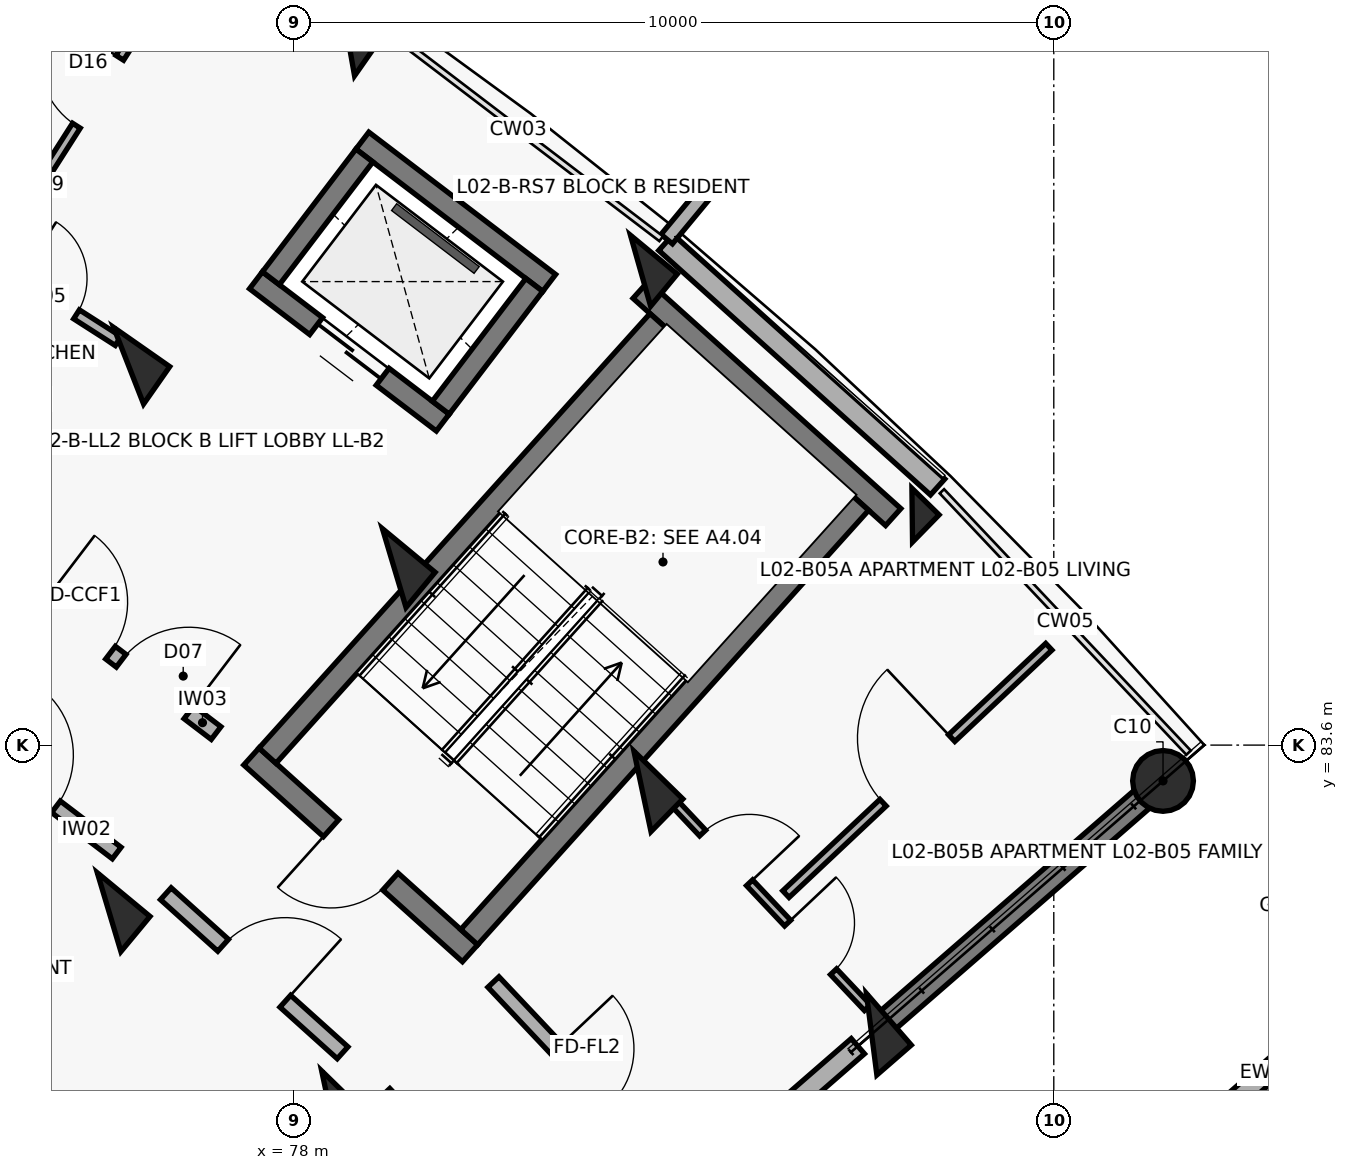
"""IFC4 building model, lengths in metres.
Left out: names, types, materials, properties, quantities, classifications, styles, units other than length and angle.
Written with IfcOpenShell. Run it as: python <this file> out.ifc"""

import sys

from ifc_helpers import new_model, si_unit, direction, frame, frame_2d, origin, origin_2d, place, context, subcontext, project, spatial, rectangle, circle, extrude, element, fill, save


model = new_model("IFC4")
c1 = context("Model", 3, precision=1e-05, world=origin(), true_north=direction((0.0, 1.0)))
c2 = subcontext(c1, "Body", "Model", "MODEL_VIEW")
j1 = project(units=[si_unit("LENGTHUNIT", "METRE"), si_unit("PLANEANGLEUNIT", "RADIAN")], contexts=[c1])
p1 = place(None, origin())
s1 = spatial("IfcSite", under=j1, at=p1, CompositionType="ELEMENT")
p2 = place(p1, origin())
s2 = spatial("IfcBuilding", under=s1, at=p2, CompositionType="ELEMENT")
p3 = place(p2, frame((0.0, 0.0, 8.1)))
s3 = spatial("IfcBuildingStorey", under=s2, at=p3, CompositionType="ELEMENT", Elevation=8.1)
p4 = place(p3, frame((75.828, 88.592, 0.0), z_axis=(0.0, 0.0, 1.0), x_axis=(0.573004420611, 0.819552276527, 0.0)))
e1 = element("IfcColumn", 1, at=p4, inside=s3, PredefinedType="COLUMN", context=c2, shape_type="SweptSolid", body=[
    extrude(rectangle(XDim=0.6, YDim=0.9, at=origin_2d()), origin(), (0.0, 0.0, 1.0), 3.1),
])
p5 = place(p3, frame((78.739, 92.755, 0.0), z_axis=(0.0, 0.0, 1.0), x_axis=(0.573004420611, 0.819552276527, 0.0)))
e2 = element("IfcColumn", 2, at=p5, inside=s3, PredefinedType="COLUMN", context=c2, shape_type="SweptSolid", body=[
    extrude(rectangle(XDim=0.5, YDim=0.5, at=origin_2d()), origin(), (0.0, 0.0, 1.0), 3.1),
])
for number, where, z_axis, x_axis in (
    (3, (75.571, 81.402, 0.0), (0.0, 0.0, 1.0), (0.638, 0.77, 0.0)),
    (4, (79.322, 85.93, 0.0), (0.0, 0.0, 1.0), (0.638, 0.77, 0.0)),
):
    element("IfcColumn", number, at=place(p3, frame(where, z_axis=z_axis, x_axis=x_axis)), inside=s3, PredefinedType="COLUMN", context=c2, shape_type="SweptSolid", body=[
        extrude(rectangle(XDim=0.6, YDim=0.9, at=origin_2d()), origin(), (0.0, 0.0, 1.0), 3.1),
    ])
p6 = place(p3, frame((82.563, 89.842, 0.0), z_axis=(0.0, 0.0, 1.0), x_axis=(0.637961754089, 0.770068049148, 0.0)))
e5 = element("IfcColumn", 5, at=p6, inside=s3, PredefinedType="COLUMN", context=c2, shape_type="SweptSolid", body=[
    extrude(rectangle(XDim=0.55, YDim=0.8, at=origin_2d()), origin(), (0.0, 0.0, 1.0), 3.1),
])
for number, where, z_axis, x_axis in (
    (6, (78.48, 78.784, 0.0), (0.0, 0.0, 1.0), (0.699, 0.715, 0.0)),
    (7, (82.588, 82.991, 0.0), (0.0, 0.0, 1.0), (0.699, 0.715, 0.0)),
):
    element("IfcColumn", number, at=place(p3, frame(where, z_axis=z_axis, x_axis=x_axis)), inside=s3, PredefinedType="COLUMN", context=c2, shape_type="SweptSolid", body=[
        extrude(rectangle(XDim=0.6, YDim=0.9, at=origin_2d()), origin(), (0.0, 0.0, 1.0), 3.1),
    ])
p7 = place(p3, frame((86.137, 86.626, 0.0), z_axis=(0.0, 0.0, 1.0), x_axis=(0.698665066769, 0.715448897181, 0.0)))
e8 = element("IfcColumn", 8, at=p7, inside=s3, PredefinedType="COLUMN", context=c2, shape_type="SweptSolid", body=[
    extrude(rectangle(XDim=0.5, YDim=0.5, at=origin_2d()), origin(), (0.0, 0.0, 1.0), 3.1),
])
p8 = place(p3, frame((85.603, 79.796, 0.0), z_axis=(0.0, 0.0, 1.0), x_axis=(0.754709580223, 0.656059028991, 0.0)))
e9 = element("IfcColumn", 9, at=p8, inside=s3, PredefinedType="COLUMN", context=c2, shape_type="SweptSolid", body=[
    extrude(rectangle(XDim=0.6, YDim=0.9, at=origin_2d()), origin(), (0.0, 0.0, 1.0), 3.1),
])
p9 = place(p3, frame((89.437, 83.129, 0.0), z_axis=(0.0, 0.0, 1.0), x_axis=(0.754709580223, 0.656059028991, 0.0)))
e10 = element("IfcColumn", 10, at=p9, inside=s3, PredefinedType="COLUMN", context=c2, shape_type="SweptSolid", body=[
    extrude(circle(Radius=0.4, at=origin_2d()), origin(), (0.0, 0.0, 1.0), 3.1),
])
p10 = place(p3, frame((85.739, 79.914, 0.0), z_axis=(0.0, 0.0, 1.0), x_axis=(0.754703505217, 0.65606601742, 0.0)))
e11 = element("IfcWall", 11, at=p10, inside=s3, PredefinedType="SHEAR", context=c2, shape_type="SweptSolid", body=[
    extrude(rectangle(XDim=4.72, YDim=0.31, at=frame_2d((2.36, 0.0))), origin(), (0.0, 0.0, 1.0), 2.86),
])
p11 = place(p3, frame((82.897, 90.213, 0.0), z_axis=(0.0, 0.0, 1.0), x_axis=(0.743387539862, -0.668860946369, 0.0)))
e12 = element("IfcWall", 12, at=p11, inside=s3, PredefinedType="SOLIDWALL", context=c2, shape_type="SweptSolid", body=[
    extrude(rectangle(XDim=4.809, YDim=0.282, at=frame_2d((2.405, 0.0))), origin(), (0.0, 0.0, 1.0), 2.25),
])
p12 = place(p3, frame((82.908, 90.257, 0.0), z_axis=(0.0, 0.0, 1.0), x_axis=(0.637967316825, 0.770063440674, 0.0)))
e13 = element("IfcWall", 13, at=p12, inside=s3, PredefinedType="PARAPET", context=c2, shape_type="SweptSolid", body=[
    extrude(rectangle(XDim=0.9, YDim=0.195, at=frame_2d((0.45, 0.0))), origin(), (0.0, 0.0, 1.0), 2.25),
])
p13 = place(p3, frame((79.234, 74.259, 0.0), z_axis=(0.0, 0.0, 1.0), x_axis=(0.754717680958, 0.656049710044, 0.0)))
e14 = element("IfcWall", 14, at=p13, inside=s3, PredefinedType="SOLIDWALL", context=c2, shape_type="SweptSolid", body=[
    extrude(rectangle(XDim=8.2, YDim=0.265, at=frame_2d((4.1, 0.0))), origin(), (0.0, 0.0, 1.0), 2.08),
])
p14 = place(p13, frame((3.59, 0.0, 0.75)))
e15 = element("IfcOpeningElement", 15, at=p14, cuts=e14, PredefinedType="OPENING", context=c2, shape_type="SweptSolid", body=[
    extrude(rectangle(XDim=1.35, YDim=1.35, at=frame_2d((0.675, 0.675))), frame((0.0, 0.142, 0.0), z_axis=(0.0, -1.0, 0.0), x_axis=(1.0, 0.0, 0.0)), (0.0, 0.0, 1.0), 0.285),
])
p15 = place(p3, frame((91.746, 80.101, 0.0), z_axis=(0.0, 0.0, 1.0), x_axis=(-0.754704866158, -0.656064451862, 0.0)))
e16 = element("IfcWall", 16, at=p15, inside=s3, PredefinedType="SOLIDWALL", context=c2, shape_type="SweptSolid", body=[
    extrude(rectangle(XDim=8.2, YDim=0.265, at=frame_2d((4.1, 0.0))), origin(), (0.0, 0.0, 1.0), 2.08),
])
p16 = place(p15, frame((3.59, 0.0, 0.75)))
e17 = element("IfcOpeningElement", 17, at=p16, cuts=e16, PredefinedType="OPENING", context=c2, shape_type="SweptSolid", body=[
    extrude(rectangle(XDim=1.35, YDim=1.35, at=frame_2d((0.675, 0.675))), frame((0.0, 0.142, 0.0), z_axis=(0.0, -1.0, 0.0), x_axis=(1.0, 0.0, 0.0)), (0.0, 0.0, 1.0), 0.285),
])
p17 = place(p3, frame((80.32, 80.862, 0.0), z_axis=(0.0, 0.0, 1.0), x_axis=(-0.743375696158, 0.668874109501, 0.0)))
e18 = element("IfcWall", 18, at=p17, inside=s3, PredefinedType="SHEAR", context=c2, shape_type="SweptSolid", body=[
    extrude(rectangle(XDim=3.87, YDim=0.3, at=frame_2d((1.935, 0.0))), origin(), (0.0, 0.0, 1.0), 3.1),
])
p18 = place(p17, frame((1.41, 0.0, 0.0)))
e19 = element("IfcOpeningElement", 19, at=p18, cuts=e18, PredefinedType="OPENING", context=c2, shape_type="SweptSolid", body=[
    extrude(rectangle(XDim=1.05, YDim=2.15, at=frame_2d((0.525, 1.075))), frame((0.0, 0.16, 0.0), z_axis=(0.0, -1.0, 0.0), x_axis=(1.0, 0.0, 0.0)), (0.0, 0.0, 1.0), 0.32),
])
p19 = place(p3, frame((85.887, 86.601, 0.0), z_axis=(0.0, 0.0, 1.0), x_axis=(-0.743400052815, 0.668847038922, 0.0)))
e20 = element("IfcWall", 20, at=p19, inside=s3, PredefinedType="SHEAR", context=c2, shape_type="SweptSolid", body=[
    extrude(rectangle(XDim=4.47, YDim=0.3, at=frame_2d((2.235, 0.0))), origin(), (0.0, 0.0, 1.0), 3.1),
])
p20 = place(p3, frame((80.309, 81.073, 0.0), z_axis=(0.0, 0.0, 1.0), x_axis=(0.668885797871, 0.743365179038, 0.0)))
e21 = element("IfcWall", 21, at=p20, inside=s3, PredefinedType="SHEAR", context=c2, shape_type="SweptSolid", body=[
    extrude(rectangle(XDim=7.69, YDim=0.3, at=frame_2d((3.845, 0.0))), origin(), (0.0, 0.0, 1.0), 3.1),
])
p21 = place(p3, frame((77.655, 83.461, 0.0), z_axis=(0.0, 0.0, 1.0), x_axis=(0.668868253964, 0.743380964808, 0.0)))
e22 = element("IfcWall", 22, at=p21, inside=s3, PredefinedType="SHEAR", context=c2, shape_type="SweptSolid", body=[
    extrude(rectangle(XDim=7.69, YDim=0.3, at=frame_2d((3.845, 0.0))), origin(), (0.0, 0.0, 1.0), 3.1),
])
p22 = place(p3, frame((79.961, 87.844, 0.0), z_axis=(0.0, 0.0, 1.0), x_axis=(-0.795464365424, 0.606000365793, 0.0)))
e23 = element("IfcWall", 23, at=p22, inside=s3, PredefinedType="SHEAR", context=c2, shape_type="SweptSolid", body=[
    extrude(rectangle(XDim=3.09, YDim=0.28, at=frame_2d((1.545, 0.0))), origin(), (0.0, 0.0, 1.0), 3.1),
])
p23 = place(p22, frame((0.995, 0.0, 0.0)))
e24 = element("IfcOpeningElement", 24, at=p23, cuts=e23, PredefinedType="OPENING", context=c2, shape_type="SweptSolid", body=[
    extrude(rectangle(XDim=1.1, YDim=2.15, at=frame_2d((0.55, 1.075))), frame((0.0, 0.15, 0.0), z_axis=(0.0, -1.0, 0.0), x_axis=(1.0, 0.0, 0.0)), (0.0, 0.0, 1.0), 0.3),
])
p24 = place(p3, frame((81.361, 89.681, 0.0), z_axis=(0.0, 0.0, 1.0), x_axis=(-0.795502452183, 0.605950368076, 0.0)))
e25 = element("IfcWall", 25, at=p24, inside=s3, PredefinedType="SHEAR", context=c2, shape_type="SweptSolid", body=[
    extrude(rectangle(XDim=3.09, YDim=0.28, at=frame_2d((1.545, 0.0))), origin(), (0.0, 0.0, 1.0), 3.1),
])
for number, where, z_axis, x_axis in (
    (26, (79.935, 88.04, 0.0), (0.0, 0.0, 1.0), (0.606, 0.795, 0.0)),
    (27, (77.699, 89.743, 0.0), (0.0, 0.0, 1.0), (0.606, 0.795, 0.0)),
):
    element("IfcWall", number, at=place(p3, frame(where, z_axis=z_axis, x_axis=x_axis)), inside=s3, PredefinedType="SHEAR", context=c2, shape_type="SweptSolid", body=[
        extrude(rectangle(XDim=2.03, YDim=0.28, at=frame_2d((1.015, 0.0))), origin(), (0.0, 0.0, 1.0), 3.1),
    ])
p25 = place(p3, frame((72.481, 90.971, 0.0), z_axis=(0.0, 0.0, 1.0), x_axis=(0.842238809758, -0.53910461632, 0.0)))
e28 = element("IfcWall", 28, at=p25, inside=s3, PredefinedType="PARTITIONING", context=c2, shape_type="SweptSolid", body=[
    extrude(rectangle(XDim=3.81, YDim=0.14, at=frame_2d((1.905, 0.0))), origin(), (0.0, 0.0, 1.0), 2.08),
])
p26 = place(p25, frame((0.65, 0.0, 0.0)))
e29 = element("IfcOpeningElement", 29, at=p26, cuts=e28, PredefinedType="OPENING", context=c2, shape_type="SweptSolid", body=[
    extrude(rectangle(XDim=0.9, YDim=2.1, at=frame_2d((0.45, 1.05))), frame((0.0, 0.08, 0.0), z_axis=(0.0, -1.0, 0.0), x_axis=(1.0, 0.0, 0.0)), (0.0, 0.0, 1.0), 0.16),
])
p27 = place(p25, frame((2.28, 0.0, 0.0)))
e30 = element("IfcOpeningElement", 30, at=p27, cuts=e28, PredefinedType="OPENING", context=c2, shape_type="SweptSolid", body=[
    extrude(rectangle(XDim=0.88, YDim=2.1, at=frame_2d((0.44, 1.05))), frame((0.0, 0.08, 0.0), z_axis=(0.0, -1.0, 0.0), x_axis=(1.0, 0.0, 0.0)), (0.0, 0.0, 1.0), 0.16),
])
p28 = place(p3, frame((74.148, 90.195, 0.0), z_axis=(0.0, 0.0, 1.0), x_axis=(0.537779792606, 0.843085342456, 0.0)))
e31 = element("IfcWall", 31, at=p28, inside=s3, PredefinedType="PARTITIONING", context=c2, shape_type="SweptSolid", body=[
    extrude(rectangle(XDim=4.75, YDim=0.12, at=frame_2d((2.375, 0.0))), origin(), (0.0, 0.0, 1.0), 2.08),
])
p29 = place(p28, frame((1.845, 0.0, 0.0)))
e32 = element("IfcOpeningElement", 32, at=p29, cuts=e31, PredefinedType="OPENING", context=c2, shape_type="SweptSolid", body=[
    extrude(rectangle(XDim=1.06, YDim=2.1, at=frame_2d((0.53, 1.05))), frame((0.0, 0.07, 0.0), z_axis=(0.0, -1.0, 0.0), x_axis=(1.0, 0.0, 0.0)), (0.0, 0.0, 1.0), 0.14),
])
p30 = place(p3, frame((74.357, 85.756, 0.0), z_axis=(0.0, 0.0, 1.0), x_axis=(0.795498026433, -0.605956178235, 0.0)))
e33 = element("IfcWall", 33, at=p30, inside=s3, PredefinedType="SOLIDWALL", context=c2, shape_type="SweptSolid", body=[
    extrude(rectangle(XDim=3.296, YDim=0.21, at=frame_2d((1.648, 0.0))), origin(), (0.0, 0.0, 1.0), 2.08),
])
p31 = place(p30, frame((0.45, 0.0, 0.0)))
e34 = element("IfcOpeningElement", 34, at=p31, cuts=e33, PredefinedType="OPENING", context=c2, shape_type="SweptSolid", body=[
    extrude(rectangle(XDim=1.1, YDim=2.15, at=frame_2d((0.55, 1.075))), frame((0.0, 0.115, 0.0), z_axis=(0.0, -1.0, 0.0), x_axis=(1.0, 0.0, 0.0)), (0.0, 0.0, 1.0), 0.23),
])
p32 = place(p30, frame((1.726, 0.0, 0.0)))
e35 = element("IfcOpeningElement", 35, at=p32, cuts=e33, PredefinedType="OPENING", context=c2, shape_type="SweptSolid", body=[
    extrude(rectangle(XDim=1.12, YDim=2.15, at=frame_2d((0.56, 1.075))), frame((0.0, 0.115, 0.0), z_axis=(0.0, -1.0, 0.0), x_axis=(1.0, 0.0, 0.0)), (0.0, 0.0, 1.0), 0.23),
])
p33 = place(p3, frame((73.182, 84.076, 0.0), z_axis=(0.0, 0.0, 1.0), x_axis=(0.795501577908, -0.605951515838, 0.0)))
e36 = element("IfcWall", 36, at=p33, inside=s3, PredefinedType="SOLIDWALL", context=c2, shape_type="SweptSolid", body=[
    extrude(rectangle(XDim=3.129, YDim=0.19, at=frame_2d((1.564, 0.0))), origin(), (0.0, 0.0, 1.0), 2.08),
])
p34 = place(p33, frame((1.004, 0.0, 0.0)))
e37 = element("IfcOpeningElement", 37, at=p34, cuts=e36, PredefinedType="OPENING", context=c2, shape_type="SweptSolid", body=[
    extrude(rectangle(XDim=1.12, YDim=2.15, at=frame_2d((0.56, 1.075))), frame((0.0, 0.105, 0.0), z_axis=(0.0, -1.0, 0.0), x_axis=(1.0, 0.0, 0.0)), (0.0, 0.0, 1.0), 0.21),
])
p35 = place(p3, frame((76.317, 81.644, 0.0), z_axis=(0.0, 0.0, 1.0), x_axis=(0.743387266925, -0.668861249718, 0.0)))
e38 = element("IfcWall", 38, at=p35, inside=s3, PredefinedType="SOLIDWALL", context=c2, shape_type="SweptSolid", body=[
    extrude(rectangle(XDim=3.128, YDim=0.21, at=frame_2d((1.564, 0.0))), origin(), (0.0, 0.0, 1.0), 2.08),
])
p36 = place(p35, frame((1.014, 0.0, 0.0)))
e39 = element("IfcOpeningElement", 39, at=p36, cuts=e38, PredefinedType="OPENING", context=c2, shape_type="SweptSolid", body=[
    extrude(rectangle(XDim=1.1, YDim=2.15, at=frame_2d((0.55, 1.075))), frame((0.0, 0.115, 0.0), z_axis=(0.0, -1.0, 0.0), x_axis=(1.0, 0.0, 0.0)), (0.0, 0.0, 1.0), 0.23),
])
p37 = place(p3, frame((80.628, 80.483, 0.0), z_axis=(0.0, 0.0, 1.0), x_axis=(0.686310507227, -0.727308660522, 0.0)))
e40 = element("IfcWall", 40, at=p37, inside=s3, PredefinedType="SOLIDWALL", context=c2, shape_type="SweptSolid", body=[
    extrude(rectangle(XDim=3.436, YDim=0.2, at=frame_2d((1.718, 0.0))), origin(), (0.0, 0.0, 1.0), 2.08),
])
p38 = place(p37, frame((1.208, 0.0, 0.0)))
e41 = element("IfcOpeningElement", 41, at=p38, cuts=e40, PredefinedType="OPENING", context=c2, shape_type="SweptSolid", body=[
    extrude(rectangle(XDim=1.02, YDim=2.15, at=frame_2d((0.51, 1.075))), frame((0.0, 0.11, 0.0), z_axis=(0.0, -1.0, 0.0), x_axis=(1.0, 0.0, 0.0)), (0.0, 0.0, 1.0), 0.22),
])
p39 = place(p3, frame((79.195, 79.016, 0.0), z_axis=(0.0, 0.0, 1.0), x_axis=(0.686307658735, -0.727311348434, 0.0)))
e42 = element("IfcWall", 42, at=p39, inside=s3, PredefinedType="SOLIDWALL", context=c2, shape_type="SweptSolid", body=[
    extrude(rectangle(XDim=3.269, YDim=0.19, at=frame_2d((1.634, 0.0))), origin(), (0.0, 0.0, 1.0), 2.08),
])
p40 = place(p39, frame((1.154, 0.0, 0.0)))
e43 = element("IfcOpeningElement", 43, at=p40, cuts=e42, PredefinedType="OPENING", context=c2, shape_type="SweptSolid", body=[
    extrude(rectangle(XDim=0.96, YDim=2.1, at=frame_2d((0.48, 1.05))), frame((0.0, 0.105, 0.0), z_axis=(0.0, -1.0, 0.0), x_axis=(1.0, 0.0, 0.0)), (0.0, 0.0, 1.0), 0.21),
])
p41 = place(p3, frame((82.934, 82.916, 0.0), z_axis=(0.0, 0.0, 1.0), x_axis=(0.686301674417, -0.727316995327, 0.0)))
e44 = element("IfcWall", 44, at=p41, inside=s3, PredefinedType="PARTITIONING", context=c2, shape_type="SweptSolid", body=[
    extrude(rectangle(XDim=3.81, YDim=0.11, at=frame_2d((1.905, 0.0))), origin(), (0.0, 0.0, 1.0), 2.08),
])
p42 = place(p41, frame((0.65, 0.0, 0.0)))
e45 = element("IfcOpeningElement", 45, at=p42, cuts=e44, PredefinedType="OPENING", context=c2, shape_type="SweptSolid", body=[
    extrude(rectangle(XDim=0.9, YDim=2.1, at=frame_2d((0.45, 1.05))), frame((0.0, 0.065, 0.0), z_axis=(0.0, -1.0, 0.0), x_axis=(1.0, 0.0, 0.0)), (0.0, 0.0, 1.0), 0.13),
])
p43 = place(p41, frame((2.28, 0.0, 0.0)))
e46 = element("IfcOpeningElement", 46, at=p43, cuts=e44, PredefinedType="OPENING", context=c2, shape_type="SweptSolid", body=[
    extrude(rectangle(XDim=0.88, YDim=2.1, at=frame_2d((0.44, 1.05))), frame((0.0, 0.065, 0.0), z_axis=(0.0, -1.0, 0.0), x_axis=(1.0, 0.0, 0.0)), (0.0, 0.0, 1.0), 0.13),
])
p44 = place(p3, frame((84.475, 81.639, 0.0), z_axis=(0.0, 0.0, 1.0), x_axis=(0.728314662127, 0.685242842306, 0.0)))
e47 = element("IfcWall", 47, at=p44, inside=s3, PredefinedType="PARTITIONING", context=c2, shape_type="SweptSolid", body=[
    extrude(rectangle(XDim=4.75, YDim=0.12, at=frame_2d((2.375, 0.0))), origin(), (0.0, 0.0, 1.0), 2.08),
])
p45 = place(p44, frame((1.755, 0.0, 0.0)))
e48 = element("IfcOpeningElement", 48, at=p45, cuts=e47, PredefinedType="OPENING", context=c2, shape_type="SweptSolid", body=[
    extrude(rectangle(XDim=1.24, YDim=2.1, at=frame_2d((0.62, 1.05))), frame((0.0, 0.07, 0.0), z_axis=(0.0, -1.0, 0.0), x_axis=(1.0, 0.0, 0.0)), (0.0, 0.0, 1.0), 0.14),
])
p46 = place(p18, origin())
e49 = element("IfcDoor", 49, at=p46, inside=s3, OperationType="SINGLE_SWING_RIGHT", PredefinedType="DOOR", context=c2, shape_type="SweptSolid", body=[
    extrude(rectangle(XDim=1.05, YDim=2.15, at=frame_2d((0.525, 1.075))), frame((0.0, 0.025, 0.0), z_axis=(0.0, -1.0, 0.0), x_axis=(1.0, 0.0, 0.0)), (0.0, 0.0, 1.0), 0.05),
])
fill(e19, e49)
p47 = place(p23, origin())
e50 = element("IfcDoor", 50, at=p47, inside=s3, OperationType="DOUBLE_DOOR_SLIDING", PredefinedType="DOOR", context=c2, shape_type="SweptSolid", body=[
    extrude(rectangle(XDim=1.1, YDim=2.15, at=frame_2d((0.55, 1.075))), frame((0.0, 0.025, 0.0), z_axis=(0.0, -1.0, 0.0), x_axis=(1.0, 0.0, 0.0)), (0.0, 0.0, 1.0), 0.05),
])
fill(e24, e50)
p48 = place(p27, origin())
e51 = element("IfcDoor", 51, at=p48, inside=s3, OperationType="SINGLE_SWING_LEFT", PredefinedType="DOOR", context=c2, shape_type="SweptSolid", body=[
    extrude(rectangle(XDim=0.88, YDim=2.1, at=frame_2d((0.44, 1.05))), frame((0.0, 0.025, 0.0), z_axis=(0.0, -1.0, 0.0), x_axis=(1.0, 0.0, 0.0)), (0.0, 0.0, 1.0), 0.05),
])
fill(e30, e51)
p49 = place(p29, origin())
e52 = element("IfcDoor", 52, at=p49, inside=s3, OperationType="SINGLE_SWING_RIGHT", PredefinedType="DOOR", context=c2, shape_type="SweptSolid", body=[
    extrude(rectangle(XDim=1.06, YDim=2.1, at=frame_2d((0.53, 1.05))), frame((0.0, 0.025, 0.0), z_axis=(0.0, -1.0, 0.0), x_axis=(1.0, 0.0, 0.0)), (0.0, 0.0, 1.0), 0.05),
])
fill(e32, e52)
p50 = place(p31, origin())
e53 = element("IfcDoor", 53, at=p50, inside=s3, OperationType="SINGLE_SWING_LEFT", PredefinedType="DOOR", context=c2, shape_type="SweptSolid", body=[
    extrude(rectangle(XDim=1.1, YDim=2.15, at=frame_2d((0.55, 1.075))), frame((0.0, 0.025, 0.0), z_axis=(0.0, -1.0, 0.0), x_axis=(1.0, 0.0, 0.0)), (0.0, 0.0, 1.0), 0.05),
])
fill(e34, e53)
p51 = place(p32, origin())
e54 = element("IfcDoor", 54, at=p51, inside=s3, OperationType="SINGLE_SWING_RIGHT", PredefinedType="DOOR", context=c2, shape_type="SweptSolid", body=[
    extrude(rectangle(XDim=1.12, YDim=2.15, at=frame_2d((0.56, 1.075))), frame((0.0, 0.025, 0.0), z_axis=(0.0, -1.0, 0.0), x_axis=(1.0, 0.0, 0.0)), (0.0, 0.0, 1.0), 0.05),
])
fill(e35, e54)
p52 = place(p34, origin())
e55 = element("IfcDoor", 55, at=p52, inside=s3, OperationType="SINGLE_SWING_LEFT", PredefinedType="DOOR", context=c2, shape_type="SweptSolid", body=[
    extrude(rectangle(XDim=1.12, YDim=2.15, at=frame_2d((0.56, 1.075))), frame((0.0, 0.025, 0.0), z_axis=(0.0, -1.0, 0.0), x_axis=(1.0, 0.0, 0.0)), (0.0, 0.0, 1.0), 0.05),
])
fill(e37, e55)
p53 = place(p36, origin())
e56 = element("IfcDoor", 56, at=p53, inside=s3, OperationType="SINGLE_SWING_RIGHT", PredefinedType="DOOR", context=c2, shape_type="SweptSolid", body=[
    extrude(rectangle(XDim=1.1, YDim=2.15, at=frame_2d((0.55, 1.075))), frame((0.0, 0.025, 0.0), z_axis=(0.0, -1.0, 0.0), x_axis=(1.0, 0.0, 0.0)), (0.0, 0.0, 1.0), 0.05),
])
fill(e39, e56)
p54 = place(p38, origin())
e57 = element("IfcDoor", 57, at=p54, inside=s3, OperationType="SINGLE_SWING_LEFT", PredefinedType="DOOR", context=c2, shape_type="SweptSolid", body=[
    extrude(rectangle(XDim=1.02, YDim=2.15, at=frame_2d((0.51, 1.075))), frame((0.0, 0.025, 0.0), z_axis=(0.0, -1.0, 0.0), x_axis=(1.0, 0.0, 0.0)), (0.0, 0.0, 1.0), 0.05),
])
fill(e41, e57)
p55 = place(p42, origin())
e58 = element("IfcDoor", 58, at=p55, inside=s3, OperationType="SINGLE_SWING_RIGHT", PredefinedType="DOOR", context=c2, shape_type="SweptSolid", body=[
    extrude(rectangle(XDim=0.9, YDim=2.1, at=frame_2d((0.45, 1.05))), frame((0.0, 0.025, 0.0), z_axis=(0.0, -1.0, 0.0), x_axis=(1.0, 0.0, 0.0)), (0.0, 0.0, 1.0), 0.05),
])
fill(e45, e58)
p56 = place(p43, origin())
e59 = element("IfcDoor", 59, at=p56, inside=s3, OperationType="SINGLE_SWING_LEFT", PredefinedType="DOOR", context=c2, shape_type="SweptSolid", body=[
    extrude(rectangle(XDim=0.88, YDim=2.1, at=frame_2d((0.44, 1.05))), frame((0.0, 0.025, 0.0), z_axis=(0.0, -1.0, 0.0), x_axis=(1.0, 0.0, 0.0)), (0.0, 0.0, 1.0), 0.05),
])
fill(e46, e59)
p57 = place(p45, origin())
e60 = element("IfcDoor", 60, at=p57, inside=s3, OperationType="SINGLE_SWING_RIGHT", PredefinedType="DOOR", context=c2, shape_type="SweptSolid", body=[
    extrude(rectangle(XDim=1.24, YDim=2.1, at=frame_2d((0.62, 1.05))), frame((0.0, 0.025, 0.0), z_axis=(0.0, -1.0, 0.0), x_axis=(1.0, 0.0, 0.0)), (0.0, 0.0, 1.0), 0.05),
])
fill(e48, e60)
save(model, sys.argv[1])
